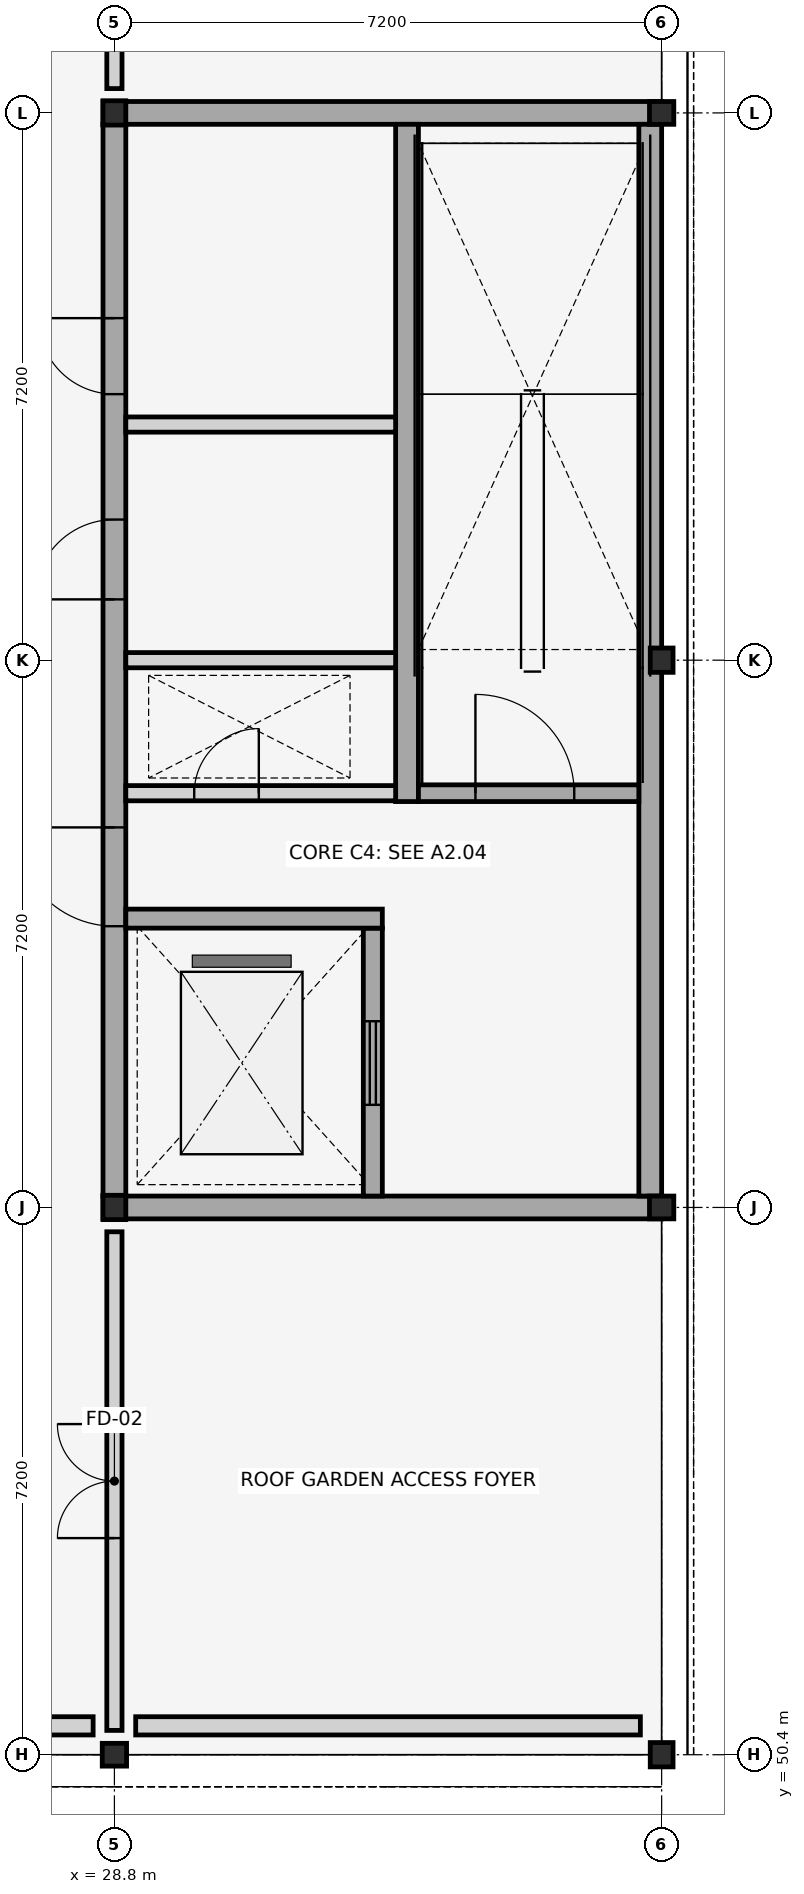
"""IFC4 building model, lengths in metres.
Left out: names, types, materials, properties, quantities, classifications, styles, units other than length and angle.
Written with IfcOpenShell. Run it as: python <this file> out.ifc"""

import sys

from ifc_helpers import new_model, si_unit, direction, frame, frame_2d, origin, origin_2d, place, context, subcontext, project, spatial, rectangle, i_section, extrude, element, fill, save


model = new_model("IFC4")
c1 = context("Model", 3, precision=1e-05, world=origin(), true_north=direction((0.0, 1.0)))
c2 = subcontext(c1, "Body", "Model", "MODEL_VIEW")
j1 = project(units=[si_unit("LENGTHUNIT", "METRE"), si_unit("PLANEANGLEUNIT", "RADIAN")], contexts=[c1])
p1 = place(None, origin())
s1 = spatial("IfcSite", under=j1, at=p1, CompositionType="ELEMENT")
p2 = place(p1, origin())
s2 = spatial("IfcBuilding", under=s1, at=p2, CompositionType="ELEMENT")
p3 = place(p2, frame((0.0, 0.0, 8.7)))
s3 = spatial("IfcBuildingStorey", under=s2, at=p3, CompositionType="ELEMENT", Elevation=8.7)
for number, where, z_axis, x_axis in (
    (1, (28.8, 50.4, 0.0), (0.0, 0.0, 1.0), (0.0, 1.0, 0.0)),
    (2, (28.8, 57.6, 0.0), (0.0, 0.0, 1.0), (1.0, 0.0, 0.0)),
    (3, (28.8, 72.0, 0.0), (0.0, 0.0, 1.0), (1.0, 0.0, 0.0)),
    (4, (36.0, 50.4, 0.0), (0.0, 0.0, 1.0), (1.0, 0.0, 0.0)),
    (5, (36.0, 57.6, 0.0), (0.0, 0.0, 1.0), (0.0, 1.0, 0.0)),
    (6, (36.0, 64.8, 0.0), (0.0, 0.0, 1.0), (1.0, 0.0, 0.0)),
    (7, (36.0, 72.0, 0.0), (0.0, 0.0, 1.0), (0.0, 1.0, 0.0)),
):
    element("IfcColumn", number, at=place(p3, frame(where, z_axis=z_axis, x_axis=x_axis)), inside=s3, PredefinedType="COLUMN", context=c2, shape_type="SweptSolid", body=[
        extrude(i_section(OverallWidth=0.3, OverallDepth=0.32, WebThickness=0.011, FlangeThickness=0.021, FilletRadius=0.027, at=origin_2d()), origin(), (0.0, 0.0, 1.0), 4.2),
    ])
p4 = place(p3, frame((21.88, 50.78, 0.0), z_axis=(0.0, 0.0, 1.0), x_axis=(1.0, 0.0, 0.0)))
e8 = element("IfcWall", 8, at=p4, inside=s3, PredefinedType="STANDARD", context=c2, shape_type="SweptSolid", body=[
    extrude(rectangle(XDim=6.64, YDim=0.24, at=frame_2d((3.32, 0.0))), origin(), (0.0, 0.0, 1.0), 3.56),
])
p5 = place(p3, frame((29.08, 50.78, 0.0), z_axis=(0.0, 0.0, 1.0), x_axis=(1.0, 0.0, 0.0)))
e9 = element("IfcWall", 9, at=p5, inside=s3, PredefinedType="STANDARD", context=c2, shape_type="SweptSolid", body=[
    extrude(rectangle(XDim=6.64, YDim=0.24, at=frame_2d((3.32, 0.0))), origin(), (0.0, 0.0, 1.0), 3.56),
])
for number, where, z_axis, x_axis in (
    (10, (28.65, 57.6, 0.0), (0.0, 0.0, 1.0), (1.0, 0.0, 0.0)),
    (11, (28.65, 72.0, 0.0), (0.0, 0.0, 1.0), (1.0, 0.0, 0.0)),
):
    element("IfcWall", number, at=place(p3, frame(where, z_axis=z_axis, x_axis=x_axis)), inside=s3, PredefinedType="SHEAR", context=c2, shape_type="SweptSolid", body=[
        extrude(rectangle(XDim=7.35, YDim=0.3, at=frame_2d((3.675, 0.0))), origin(), (0.0, 0.0, 1.0), 3.96),
    ])
p6 = place(p3, frame((35.85, 57.75, 0.0), z_axis=(0.0, 0.0, 1.0), x_axis=(0.0, 1.0, 0.0)))
e12 = element("IfcWall", 12, at=p6, inside=s3, PredefinedType="SHEAR", context=c2, shape_type="SweptSolid", body=[
    extrude(rectangle(XDim=14.1, YDim=0.3, at=frame_2d((7.05, 0.0))), origin(), (0.0, 0.0, 1.0), 3.96),
])
p7 = place(p3, frame((28.8, 57.75, 0.0), z_axis=(0.0, 0.0, 1.0), x_axis=(0.0, 1.0, 0.0)))
e13 = element("IfcWall", 13, at=p7, inside=s3, PredefinedType="SHEAR", context=c2, shape_type="SweptSolid", body=[
    extrude(rectangle(XDim=14.1, YDim=0.3, at=frame_2d((7.05, 0.0))), origin(), (0.0, 0.0, 1.0), 3.96),
])
p8 = place(p7, frame((3.55, 0.0, 0.0)))
e14 = element("IfcOpeningElement", 14, at=p8, cuts=e13, PredefinedType="OPENING", context=c2, shape_type="SweptSolid", body=[
    extrude(rectangle(XDim=1.3, YDim=2.2, at=frame_2d((0.65, 1.1))), frame((0.0, 0.16, 0.0), z_axis=(0.0, -1.0, 0.0), x_axis=(1.0, 0.0, 0.0)), (0.0, 0.0, 1.0), 0.32),
])
p9 = place(p7, frame((7.85, 0.0, 0.0)))
e15 = element("IfcOpeningElement", 15, at=p9, cuts=e13, PredefinedType="OPENING", context=c2, shape_type="SweptSolid", body=[
    extrude(rectangle(XDim=1.05, YDim=2.15, at=frame_2d((0.525, 1.075))), frame((0.0, 0.16, 0.0), z_axis=(0.0, -1.0, 0.0), x_axis=(1.0, 0.0, 0.0)), (0.0, 0.0, 1.0), 0.32),
])
p10 = place(p7, frame((10.55, 0.0, 0.0)))
e16 = element("IfcOpeningElement", 16, at=p10, cuts=e13, PredefinedType="OPENING", context=c2, shape_type="SweptSolid", body=[
    extrude(rectangle(XDim=1.0, YDim=2.15, at=frame_2d((0.5, 1.075))), frame((0.0, 0.16, 0.0), z_axis=(0.0, -1.0, 0.0), x_axis=(1.0, 0.0, 0.0)), (0.0, 0.0, 1.0), 0.32),
])
p11 = place(p3, frame((32.2, 57.75, 0.0), z_axis=(0.0, 0.0, 1.0), x_axis=(0.0, 1.0, 0.0)))
e17 = element("IfcWall", 17, at=p11, inside=s3, PredefinedType="SHEAR", context=c2, shape_type="SweptSolid", body=[
    extrude(rectangle(XDim=3.525, YDim=0.25, at=frame_2d((1.762, 0.0))), origin(), (0.0, 0.0, 1.0), 3.96),
])
p12 = place(p11, frame((1.2, 0.0, 0.0)))
e18 = element("IfcOpeningElement", 18, at=p12, cuts=e17, PredefinedType="OPENING", context=c2, shape_type="SweptSolid", body=[
    extrude(rectangle(XDim=1.1, YDim=2.15, at=frame_2d((0.55, 1.075))), frame((0.0, 0.135, 0.0), z_axis=(0.0, -1.0, 0.0), x_axis=(1.0, 0.0, 0.0)), (0.0, 0.0, 1.0), 0.27),
])
p13 = place(p3, frame((32.65, 62.94, 0.0), z_axis=(0.0, 0.0, 1.0), x_axis=(0.0, 1.0, 0.0)))
e19 = element("IfcWall", 19, at=p13, inside=s3, PredefinedType="SHEAR", context=c2, shape_type="SweptSolid", body=[
    extrude(rectangle(XDim=8.91, YDim=0.3, at=frame_2d((4.455, 0.0))), origin(), (0.0, 0.0, 1.0), 3.96),
])
p14 = place(p3, frame((28.95, 63.05, 0.0), z_axis=(0.0, 0.0, 1.0), x_axis=(1.0, 0.0, 0.0)))
e20 = element("IfcWall", 20, at=p14, inside=s3, PredefinedType="PLUMBINGWALL", context=c2, shape_type="SweptSolid", body=[
    extrude(rectangle(XDim=3.55, YDim=0.2, at=frame_2d((1.775, 0.0))), origin(), (0.0, 0.0, 1.0), 3.38),
])
p15 = place(p14, frame((0.9, 0.0, 0.0)))
e21 = element("IfcOpeningElement", 21, at=p15, cuts=e20, PredefinedType="OPENING", context=c2, shape_type="SweptSolid", body=[
    extrude(rectangle(XDim=0.85, YDim=2.05, at=frame_2d((0.425, 1.025))), frame((0.0, 0.11, 0.0), z_axis=(0.0, -1.0, 0.0), x_axis=(1.0, 0.0, 0.0)), (0.0, 0.0, 1.0), 0.22),
])
p16 = place(p3, frame((32.8, 63.05, 0.0), z_axis=(0.0, 0.0, 1.0), x_axis=(1.0, 0.0, 0.0)))
e22 = element("IfcWall", 22, at=p16, inside=s3, PredefinedType="SHEAR", context=c2, shape_type="SweptSolid", body=[
    extrude(rectangle(XDim=2.9, YDim=0.22, at=frame_2d((1.45, 0.0))), origin(), (0.0, 0.0, 1.0), 3.96),
])
p17 = place(p16, frame((0.75, 0.0, 0.0)))
e23 = element("IfcOpeningElement", 23, at=p17, cuts=e22, PredefinedType="OPENING", context=c2, shape_type="SweptSolid", body=[
    extrude(rectangle(XDim=1.3, YDim=2.2, at=frame_2d((0.65, 1.1))), frame((0.0, 0.12, 0.0), z_axis=(0.0, -1.0, 0.0), x_axis=(1.0, 0.0, 0.0)), (0.0, 0.0, 1.0), 0.24),
])
p18 = place(p3, frame((28.95, 61.4, 0.0), z_axis=(0.0, 0.0, 1.0), x_axis=(1.0, 0.0, 0.0)))
e24 = element("IfcWall", 24, at=p18, inside=s3, PredefinedType="SHEAR", context=c2, shape_type="SweptSolid", body=[
    extrude(rectangle(XDim=3.375, YDim=0.25, at=frame_2d((1.688, 0.0))), origin(), (0.0, 0.0, 1.0), 3.96),
])
for number, where, z_axis, x_axis in (
    (25, (28.95, 64.8, 0.0), (0.0, 0.0, 1.0), (1.0, 0.0, 0.0)),
    (26, (28.95, 67.9, 0.0), (0.0, 0.0, 1.0), (1.0, 0.0, 0.0)),
):
    element("IfcWall", number, at=place(p3, frame(where, z_axis=z_axis, x_axis=x_axis)), inside=s3, PredefinedType="PLUMBINGWALL", context=c2, shape_type="SweptSolid", body=[
        extrude(rectangle(XDim=3.55, YDim=0.2, at=frame_2d((1.775, 0.0))), origin(), (0.0, 0.0, 1.0), 3.38),
    ])
p19 = place(p3, frame((28.8, 72.32, 0.0), z_axis=(0.0, 0.0, 1.0), x_axis=(0.0, 1.0, 0.0)))
e27 = element("IfcWall", 27, at=p19, inside=s3, PredefinedType="PARTITIONING", context=c2, shape_type="SweptSolid", body=[
    extrude(rectangle(XDim=20.96, YDim=0.2, at=frame_2d((10.48, 0.0))), origin(), (0.0, 0.0, 1.0), 3.15),
])
p20 = place(p19, frame((9.68, 0.0, 0.0)))
e28 = element("IfcOpeningElement", 28, at=p20, cuts=e27, PredefinedType="OPENING", context=c2, shape_type="SweptSolid", body=[
    extrude(rectangle(XDim=1.6, YDim=2.35, at=frame_2d((0.8, 1.175))), frame((0.0, 0.11, 0.0), z_axis=(0.0, -1.0, 0.0), x_axis=(1.0, 0.0, 0.0)), (0.0, 0.0, 1.0), 0.22),
])
p21 = place(p3, frame((28.8, 50.72, 0.0), z_axis=(0.0, 0.0, 1.0), x_axis=(0.0, 1.0, 0.0)))
e29 = element("IfcWall", 29, at=p21, inside=s3, PredefinedType="PARTITIONING", context=c2, shape_type="SweptSolid", body=[
    extrude(rectangle(XDim=6.56, YDim=0.2, at=frame_2d((3.28, 0.0))), origin(), (0.0, 0.0, 1.0), 3.15),
])
p22 = place(p21, frame((2.53, 0.0, 0.0)))
e30 = element("IfcOpeningElement", 30, at=p22, cuts=e29, PredefinedType="OPENING", context=c2, shape_type="SweptSolid", body=[
    extrude(rectangle(XDim=1.5, YDim=2.25, at=frame_2d((0.75, 1.125))), frame((0.0, 0.11, 0.0), z_axis=(0.0, -1.0, 0.0), x_axis=(1.0, 0.0, 0.0)), (0.0, 0.0, 1.0), 0.22),
])
p23 = place(p8, origin())
e31 = element("IfcDoor", 31, at=p23, inside=s3, OperationType="SINGLE_SWING_RIGHT", PredefinedType="DOOR", context=c2, shape_type="SweptSolid", body=[
    extrude(rectangle(XDim=1.3, YDim=2.2, at=frame_2d((0.65, 1.1))), frame((0.0, 0.025, 0.0), z_axis=(0.0, -1.0, 0.0), x_axis=(1.0, 0.0, 0.0)), (0.0, 0.0, 1.0), 0.05),
])
fill(e14, e31)
p24 = place(p9, origin())
e32 = element("IfcDoor", 32, at=p24, inside=s3, OperationType="SINGLE_SWING_LEFT", PredefinedType="DOOR", context=c2, shape_type="SweptSolid", body=[
    extrude(rectangle(XDim=1.05, YDim=2.15, at=frame_2d((0.525, 1.075))), frame((0.0, 0.025, 0.0), z_axis=(0.0, -1.0, 0.0), x_axis=(1.0, 0.0, 0.0)), (0.0, 0.0, 1.0), 0.05),
])
fill(e15, e32)
p25 = place(p10, origin())
e33 = element("IfcDoor", 33, at=p25, inside=s3, OperationType="SINGLE_SWING_RIGHT", PredefinedType="DOOR", context=c2, shape_type="SweptSolid", body=[
    extrude(rectangle(XDim=1.0, YDim=2.15, at=frame_2d((0.5, 1.075))), frame((0.0, 0.025, 0.0), z_axis=(0.0, -1.0, 0.0), x_axis=(1.0, 0.0, 0.0)), (0.0, 0.0, 1.0), 0.05),
])
fill(e16, e33)
p26 = place(p12, origin())
e34 = element("IfcDoor", 34, at=p26, inside=s3, OperationType="SLIDING_TO_LEFT", PredefinedType="DOOR", context=c2, shape_type="SweptSolid", body=[
    extrude(rectangle(XDim=1.1, YDim=2.15, at=frame_2d((0.55, 1.075))), frame((0.0, 0.025, 0.0), z_axis=(0.0, -1.0, 0.0), x_axis=(1.0, 0.0, 0.0)), (0.0, 0.0, 1.0), 0.05),
])
fill(e18, e34)
p27 = place(p15, origin())
e35 = element("IfcDoor", 35, at=p27, inside=s3, OperationType="SINGLE_SWING_RIGHT", PredefinedType="TRAPDOOR", context=c2, shape_type="SweptSolid", body=[
    extrude(rectangle(XDim=0.85, YDim=2.05, at=frame_2d((0.425, 1.025))), frame((0.0, 0.025, 0.0), z_axis=(0.0, -1.0, 0.0), x_axis=(1.0, 0.0, 0.0)), (0.0, 0.0, 1.0), 0.05),
])
fill(e21, e35)
p28 = place(p17, origin())
e36 = element("IfcDoor", 36, at=p28, inside=s3, OperationType="SINGLE_SWING_LEFT", PredefinedType="DOOR", context=c2, shape_type="SweptSolid", body=[
    extrude(rectangle(XDim=1.3, YDim=2.2, at=frame_2d((0.65, 1.1))), frame((0.0, 0.025, 0.0), z_axis=(0.0, -1.0, 0.0), x_axis=(1.0, 0.0, 0.0)), (0.0, 0.0, 1.0), 0.05),
])
fill(e23, e36)
p29 = place(p22, origin())
e37 = element("IfcDoor", 37, at=p29, inside=s3, OperationType="DOUBLE_DOOR_SINGLE_SWING", PredefinedType="DOOR", context=c2, shape_type="SweptSolid", body=[
    extrude(rectangle(XDim=1.5, YDim=2.25, at=frame_2d((0.75, 1.125))), frame((0.0, 0.025, 0.0), z_axis=(0.0, -1.0, 0.0), x_axis=(1.0, 0.0, 0.0)), (0.0, 0.0, 1.0), 0.05),
])
fill(e30, e37)
save(model, sys.argv[1])
